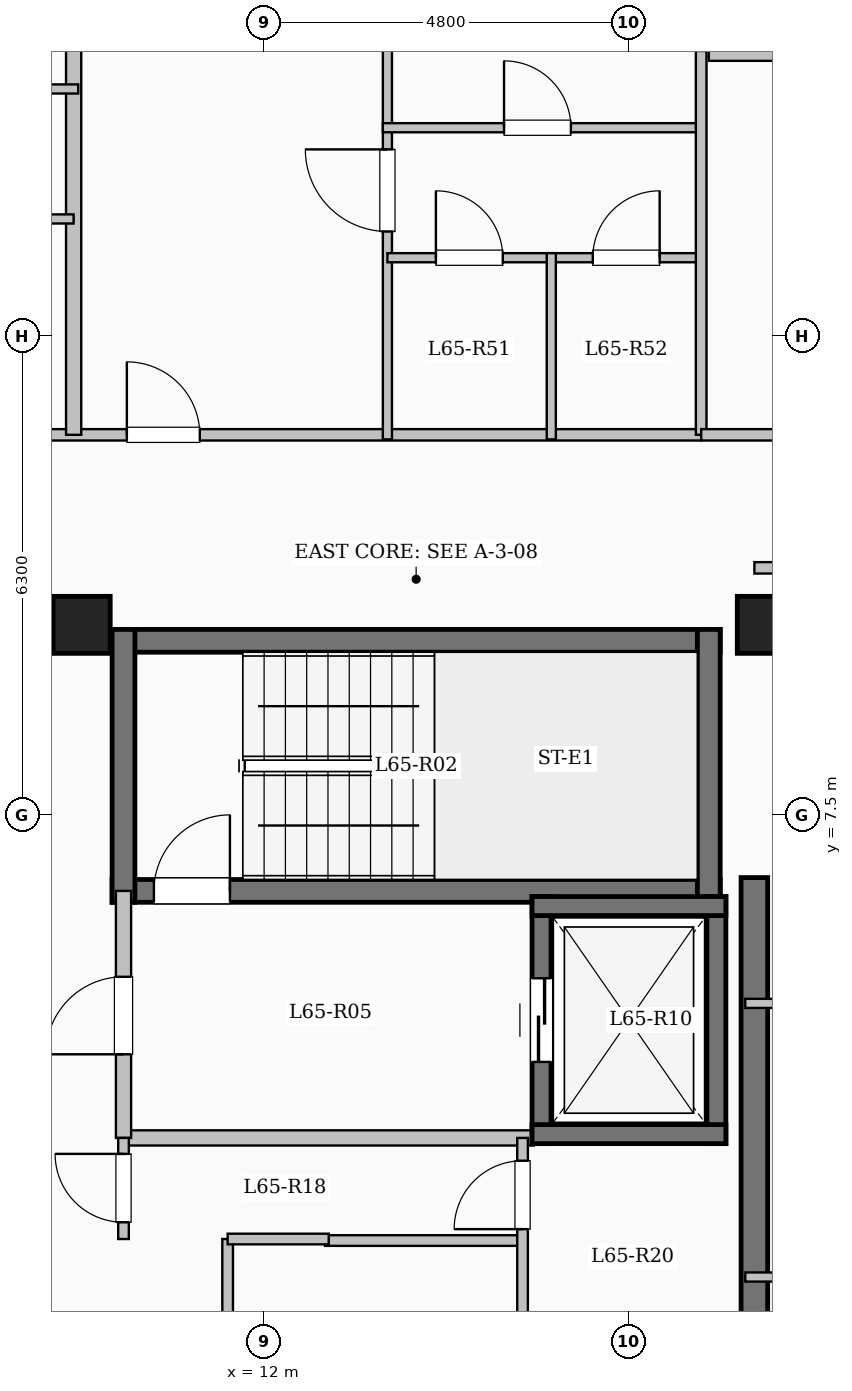
"""IFC4 building model, lengths in metres.
Left out: names, types, materials, properties, quantities, classifications, styles, units other than length and angle.
Written with IfcOpenShell. Run it as: python <this file> out.ifc"""

import sys

from ifc_helpers import new_model, si_unit, direction, frame, frame_2d, origin, origin_2d, place, context, subcontext, project, spatial, rectangle, extrude, element, fill, save


model = new_model("IFC4")
c1 = context("Model", 3, precision=1e-05, world=origin(), true_north=direction((0.0, 1.0)))
c2 = subcontext(c1, "Body", "Model", "MODEL_VIEW")
j1 = project(units=[si_unit("LENGTHUNIT", "METRE"), si_unit("PLANEANGLEUNIT", "RADIAN")], contexts=[c1])
p1 = place(None, origin())
s1 = spatial("IfcSite", under=j1, at=p1, CompositionType="ELEMENT")
p2 = place(p1, origin())
s2 = spatial("IfcBuilding", under=s1, at=p2, CompositionType="ELEMENT")
p3 = place(p2, frame((0.0, 0.0, 241.5)))
s3 = spatial("IfcBuildingStorey", under=s2, at=p3, CompositionType="ELEMENT", Elevation=241.5)
for number, where, z_axis, x_axis in (
    (1, (9.6, 10.0, 0.0), (0.0, 0.0, 1.0), (1.0, 0.0, 0.0)),
    (2, (18.6, 10.0, 0.0), (0.0, 0.0, 1.0), (1.0, 0.0, 0.0)),
):
    element("IfcColumn", number, at=place(p3, frame(where, z_axis=z_axis, x_axis=x_axis)), inside=s3, PredefinedType="COLUMN", context=c2, shape_type="SweptSolid", body=[
        extrude(rectangle(XDim=0.75, YDim=0.75, at=origin_2d()), origin(), (0.0, 0.0, 1.0), 3.35),
    ])
p4 = place(p3, frame((17.85, 17.55, 0.0), z_axis=(0.0, 0.0, 1.0), x_axis=(1.0, 0.0, 0.0)))
e3 = element("IfcWall", 3, at=p4, inside=s3, PredefinedType="SOLIDWALL", context=c2, shape_type="SweptSolid", body=[
    extrude(rectangle(XDim=4.8, YDim=0.26, at=frame_2d((2.4, 0.0))), origin(), (0.0, 0.0, 1.0), 3.1),
])
p5 = place(p4, frame((1.375, 0.0, 0.9)))
e4 = element("IfcOpeningElement", 4, at=p5, cuts=e3, PredefinedType="OPENING", context=c2, shape_type="SweptSolid", body=[
    extrude(rectangle(XDim=2.0, YDim=1.7, at=frame_2d((1.0, 0.85))), frame((0.0, 0.14, 0.0), z_axis=(0.0, -1.0, 0.0), x_axis=(1.0, 0.0, 0.0)), (0.0, 0.0, 1.0), 0.28),
])
p6 = place(p3, frame((10.0, 9.79, 0.0), z_axis=(0.0, 0.0, 1.0), x_axis=(1.0, 0.0, 0.0)))
e5 = element("IfcWall", 5, at=p6, inside=s3, PredefinedType="SHEAR", context=c2, shape_type="SweptSolid", body=[
    extrude(rectangle(XDim=8.0, YDim=0.3, at=frame_2d((4.0, 0.0))), origin(), (0.0, 0.0, 1.0), 3.35),
])
p7 = place(p3, frame((10.0, 6.5, 0.0), z_axis=(0.0, 0.0, 1.0), x_axis=(1.0, 0.0, 0.0)))
e6 = element("IfcWall", 6, at=p7, inside=s3, PredefinedType="SHEAR", context=c2, shape_type="SweptSolid", body=[
    extrude(rectangle(XDim=8.0, YDim=0.3, at=frame_2d((4.0, 0.0))), origin(), (0.0, 0.0, 1.0), 3.35),
])
p8 = place(p7, frame((0.55, 0.0, 0.0)))
e7 = element("IfcOpeningElement", 7, at=p8, cuts=e6, PredefinedType="OPENING", context=c2, shape_type="SweptSolid", body=[
    extrude(rectangle(XDim=1.0, YDim=2.15, at=frame_2d((0.5, 1.075))), frame((0.0, 0.16, 0.0), z_axis=(0.0, -1.0, 0.0), x_axis=(1.0, 0.0, 0.0)), (0.0, 0.0, 1.0), 0.32),
])
for number, where, z_axis, x_axis in (
    (8, (10.15, 6.35, 0.0), (0.0, 0.0, 1.0), (0.0, 1.0, 0.0)),
    (9, (17.85, 6.35, 0.0), (0.0, 0.0, 1.0), (0.0, 1.0, 0.0)),
):
    element("IfcWall", number, at=place(p3, frame(where, z_axis=z_axis, x_axis=x_axis)), inside=s3, PredefinedType="SHEAR", context=c2, shape_type="SweptSolid", body=[
        extrude(rectangle(XDim=3.59, YDim=0.3, at=frame_2d((1.795, 0.0))), origin(), (0.0, 0.0, 1.0), 3.35),
    ])
p9 = place(p3, frame((10.15, 3.25, 0.0), z_axis=(0.0, 0.0, 1.0), x_axis=(1.0, 0.0, 0.0)))
e10 = element("IfcWall", 10, at=p9, inside=s3, PredefinedType="SOLIDWALL", context=c2, shape_type="SweptSolid", body=[
    extrude(rectangle(XDim=5.4, YDim=0.2, at=frame_2d((2.7, 0.0))), origin(), (0.0, 0.0, 1.0), 3.1),
])
p10 = place(p3, frame((10.15, 3.25, 0.0), z_axis=(0.0, 0.0, 1.0), x_axis=(0.0, 1.0, 0.0)))
e11 = element("IfcWall", 11, at=p10, inside=s3, PredefinedType="SOLIDWALL", context=c2, shape_type="SweptSolid", body=[
    extrude(rectangle(XDim=3.25, YDim=0.2, at=frame_2d((1.625, 0.0))), origin(), (0.0, 0.0, 1.0), 3.1),
])
p11 = place(p10, frame((1.1, 0.0, 0.0)))
e12 = element("IfcOpeningElement", 12, at=p11, cuts=e11, PredefinedType="OPENING", context=c2, shape_type="SweptSolid", body=[
    extrude(rectangle(XDim=1.02, YDim=2.15, at=frame_2d((0.51, 1.075))), frame((0.0, 0.11, 0.0), z_axis=(0.0, -1.0, 0.0), x_axis=(1.0, 0.0, 0.0)), (0.0, 0.0, 1.0), 0.22),
])
p12 = place(p3, frame((15.65, 3.175, 0.0), z_axis=(0.0, 0.0, 1.0), x_axis=(0.0, 1.0, 0.0)))
e13 = element("IfcWall", 13, at=p12, inside=s3, PredefinedType="SHEAR", context=c2, shape_type="SweptSolid", body=[
    extrude(rectangle(XDim=3.25, YDim=0.25, at=frame_2d((1.625, 0.0))), origin(), (0.0, 0.0, 1.0), 3.35),
])
p13 = place(p12, frame((1.075, 0.0, 0.0)))
e14 = element("IfcOpeningElement", 14, at=p13, cuts=e13, PredefinedType="OPENING", context=c2, shape_type="SweptSolid", body=[
    extrude(rectangle(XDim=1.1, YDim=2.15, at=frame_2d((0.55, 1.075))), frame((0.0, 0.135, 0.0), z_axis=(0.0, -1.0, 0.0), x_axis=(1.0, 0.0, 0.0)), (0.0, 0.0, 1.0), 0.27),
])
p14 = place(p3, frame((17.95, 3.175, 0.0), z_axis=(0.0, 0.0, 1.0), x_axis=(0.0, 1.0, 0.0)))
e15 = element("IfcWall", 15, at=p14, inside=s3, PredefinedType="SHEAR", context=c2, shape_type="SweptSolid", body=[
    extrude(rectangle(XDim=3.25, YDim=0.25, at=frame_2d((1.625, 0.0))), origin(), (0.0, 0.0, 1.0), 3.35),
])
for number, where, z_axis, x_axis in (
    (16, (15.525, 3.3, 0.0), (0.0, 0.0, 1.0), (1.0, 0.0, 0.0)),
    (17, (15.525, 6.3, 0.0), (0.0, 0.0, 1.0), (1.0, 0.0, 0.0)),
):
    element("IfcWall", number, at=place(p3, frame(where, z_axis=z_axis, x_axis=x_axis)), inside=s3, PredefinedType="SHEAR", context=c2, shape_type="SweptSolid", body=[
        extrude(rectangle(XDim=2.55, YDim=0.25, at=frame_2d((1.275, 0.0))), origin(), (0.0, 0.0, 1.0), 3.35),
    ])
p15 = place(p3, frame((18.45, -7.375, 0.0), z_axis=(0.0, 0.0, 1.0), x_axis=(0.0, 1.0, 0.0)))
e18 = element("IfcWall", 18, at=p15, inside=s3, PredefinedType="SHEAR", context=c2, shape_type="SweptSolid", body=[
    extrude(rectangle(XDim=14.05, YDim=0.35, at=frame_2d((7.025, 0.0))), origin(), (0.0, 0.0, 1.0), 3.35),
])
p16 = place(p3, frame((12.8, 1.9, 0.0), z_axis=(0.0, 0.0, 1.0), x_axis=(1.0, 0.0, 0.0)))
e19 = element("IfcWall", 19, at=p16, inside=s3, PredefinedType="PARTITIONING", context=c2, shape_type="SweptSolid", body=[
    extrude(rectangle(XDim=2.6, YDim=0.14, at=frame_2d((1.3, 0.0))), origin(), (0.0, 0.0, 1.0), 3.1),
])
p17 = place(p3, frame((10.15, 1.92, 0.0), z_axis=(0.0, 0.0, 1.0), x_axis=(0.0, 1.0, 0.0)))
e20 = element("IfcWall", 20, at=p17, inside=s3, PredefinedType="PARTITIONING", context=c2, shape_type="SweptSolid", body=[
    extrude(rectangle(XDim=1.33, YDim=0.14, at=frame_2d((0.665, 0.0))), origin(), (0.0, 0.0, 1.0), 3.1),
])
p18 = place(p17, frame((0.22, 0.0, 0.0)))
e21 = element("IfcOpeningElement", 21, at=p18, cuts=e20, PredefinedType="OPENING", context=c2, shape_type="SweptSolid", body=[
    extrude(rectangle(XDim=0.9, YDim=2.08, at=frame_2d((0.45, 1.04))), frame((0.0, 0.08, 0.0), z_axis=(0.0, -1.0, 0.0), x_axis=(1.0, 0.0, 0.0)), (0.0, 0.0, 1.0), 0.16),
])
p19 = place(p3, frame((15.4, -7.2, 0.0), z_axis=(0.0, 0.0, 1.0), x_axis=(0.0, 1.0, 0.0)))
e22 = element("IfcWall", 22, at=p19, inside=s3, PredefinedType="PARTITIONING", context=c2, shape_type="SweptSolid", body=[
    extrude(rectangle(XDim=10.45, YDim=0.14, at=frame_2d((5.225, 0.0))), origin(), (0.0, 0.0, 1.0), 3.1),
])
p20 = place(p19, frame((9.25, 0.0, 0.0)))
e23 = element("IfcOpeningElement", 23, at=p20, cuts=e22, PredefinedType="OPENING", context=c2, shape_type="SweptSolid", body=[
    extrude(rectangle(XDim=0.9, YDim=2.08, at=frame_2d((0.45, 1.04))), frame((0.0, 0.08, 0.0), z_axis=(0.0, -1.0, 0.0), x_axis=(1.0, 0.0, 0.0)), (0.0, 0.0, 1.0), 0.16),
])
p21 = place(p3, frame((11.52, -7.2, 0.0), z_axis=(0.0, 0.0, 1.0), x_axis=(0.0, 1.0, 0.0)))
e24 = element("IfcWall", 24, at=p21, inside=s3, PredefinedType="PARTITIONING", context=c2, shape_type="SweptSolid", body=[
    extrude(rectangle(XDim=9.12, YDim=0.14, at=frame_2d((4.56, 0.0))), origin(), (0.0, 0.0, 1.0), 3.1),
])
p22 = place(p21, frame((3.8, 0.0, 0.0)))
e25 = element("IfcOpeningElement", 25, at=p22, cuts=e24, PredefinedType="OPENING", context=c2, shape_type="SweptSolid", body=[
    extrude(rectangle(XDim=0.9, YDim=2.08, at=frame_2d((0.45, 1.04))), frame((0.0, 0.08, 0.0), z_axis=(0.0, -1.0, 0.0), x_axis=(1.0, 0.0, 0.0)), (0.0, 0.0, 1.0), 0.16),
])
p23 = place(p3, frame((11.52, 1.92, 0.0), z_axis=(0.0, 0.0, 1.0), x_axis=(1.0, 0.0, 0.0)))
e26 = element("IfcWall", 26, at=p23, inside=s3, PredefinedType="PARTITIONING", context=c2, shape_type="SweptSolid", body=[
    extrude(rectangle(XDim=1.33, YDim=0.14, at=frame_2d((0.665, 0.0))), origin(), (0.0, 0.0, 1.0), 3.1),
])
p24 = place(p3, frame((3.85, 12.5, 0.0), z_axis=(0.0, 0.0, 1.0), x_axis=(1.0, 0.0, 0.0)))
e27 = element("IfcWall", 27, at=p24, inside=s3, PredefinedType="PARTITIONING", context=c2, shape_type="SweptSolid", body=[
    extrude(rectangle(XDim=13.9, YDim=0.15, at=frame_2d((6.95, 0.0))), origin(), (0.0, 0.0, 1.0), 3.1),
])
p25 = place(p24, frame((0.7, 0.0, 0.0)))
e28 = element("IfcOpeningElement", 28, at=p25, cuts=e27, PredefinedType="OPENING", context=c2, shape_type="SweptSolid", body=[
    extrude(rectangle(XDim=0.96, YDim=2.15, at=frame_2d((0.48, 1.075))), frame((0.0, 0.085, 0.0), z_axis=(0.0, -1.0, 0.0), x_axis=(1.0, 0.0, 0.0)), (0.0, 0.0, 1.0), 0.17),
])
p26 = place(p24, frame((6.344, 0.0, 0.0)))
e29 = element("IfcOpeningElement", 29, at=p26, cuts=e27, PredefinedType="OPENING", context=c2, shape_type="SweptSolid", body=[
    extrude(rectangle(XDim=0.96, YDim=2.15, at=frame_2d((0.48, 1.075))), frame((0.0, 0.085, 0.0), z_axis=(0.0, -1.0, 0.0), x_axis=(1.0, 0.0, 0.0)), (0.0, 0.0, 1.0), 0.17),
])
p27 = place(p3, frame((9.494, 12.5, 0.0), z_axis=(0.0, 0.0, 1.0), x_axis=(0.0, 1.0, 0.0)))
e30 = element("IfcWall", 30, at=p27, inside=s3, PredefinedType="SOLIDWALL", context=c2, shape_type="SweptSolid", body=[
    extrude(rectangle(XDim=8.771, YDim=0.2, at=frame_2d((4.385, 0.0))), origin(), (0.0, 0.0, 1.0), 3.1),
])
p28 = place(p3, frame((6.734, 15.34, 0.0), z_axis=(0.0, 0.0, 1.0), x_axis=(1.0, 0.0, 0.0)))
e31 = element("IfcWall", 31, at=p28, inside=s3, PredefinedType="PARTITIONING", context=c2, shape_type="SweptSolid", body=[
    extrude(rectangle(XDim=2.76, YDim=0.12, at=frame_2d((1.38, 0.0))), origin(), (0.0, 0.0, 1.0), 2.785),
])
p29 = place(p28, frame((0.94, 0.0, 0.0)))
e32 = element("IfcOpeningElement", 32, at=p29, cuts=e31, PredefinedType="OPENING", context=c2, shape_type="SweptSolid", body=[
    extrude(rectangle(XDim=0.88, YDim=2.1, at=frame_2d((0.44, 1.05))), frame((0.0, 0.07, 0.0), z_axis=(0.0, -1.0, 0.0), x_axis=(1.0, 0.0, 0.0)), (0.0, 0.0, 1.0), 0.14),
])
p30 = place(p3, frame((4.08, 17.05, 0.0), z_axis=(0.0, 0.0, 1.0), x_axis=(1.0, 0.0, 0.0)))
e33 = element("IfcWall", 33, at=p30, inside=s3, PredefinedType="PARTITIONING", context=c2, shape_type="SweptSolid", body=[
    extrude(rectangle(XDim=5.474, YDim=0.12, at=frame_2d((2.737, 0.0))), origin(), (0.0, 0.0, 1.0), 2.785),
])
p31 = place(p30, frame((0.883, 0.0, 0.0)))
e34 = element("IfcOpeningElement", 34, at=p31, cuts=e33, PredefinedType="OPENING", context=c2, shape_type="SweptSolid", body=[
    extrude(rectangle(XDim=0.88, YDim=2.1, at=frame_2d((0.44, 1.05))), frame((0.0, 0.07, 0.0), z_axis=(0.0, -1.0, 0.0), x_axis=(1.0, 0.0, 0.0)), (0.0, 0.0, 1.0), 0.14),
])
p32 = place(p30, frame((3.53, 0.0, 0.0)))
e35 = element("IfcOpeningElement", 35, at=p32, cuts=e33, PredefinedType="OPENING", context=c2, shape_type="SweptSolid", body=[
    extrude(rectangle(XDim=0.88, YDim=2.1, at=frame_2d((0.44, 1.05))), frame((0.0, 0.07, 0.0), z_axis=(0.0, -1.0, 0.0), x_axis=(1.0, 0.0, 0.0)), (0.0, 0.0, 1.0), 0.14),
])
p33 = place(p3, frame((13.622, 12.44, 0.0), z_axis=(0.0, 0.0, 1.0), x_axis=(0.0, 1.0, 0.0)))
e36 = element("IfcWall", 36, at=p33, inside=s3, PredefinedType="PARTITIONING", context=c2, shape_type="SweptSolid", body=[
    extrude(rectangle(XDim=8.46, YDim=0.12, at=frame_2d((4.23, 0.0))), origin(), (0.0, 0.0, 1.0), 3.1),
])
p34 = place(p33, frame((2.735, 0.0, 0.0)))
e37 = element("IfcOpeningElement", 37, at=p34, cuts=e36, PredefinedType="OPENING", context=c2, shape_type="SweptSolid", body=[
    extrude(rectangle(XDim=1.08, YDim=2.15, at=frame_2d((0.54, 1.075))), frame((0.0, 0.07, 0.0), z_axis=(0.0, -1.0, 0.0), x_axis=(1.0, 0.0, 0.0)), (0.0, 0.0, 1.0), 0.14),
])
p35 = place(p3, frame((13.622, 14.83, 0.0), z_axis=(0.0, 0.0, 1.0), x_axis=(1.0, 0.0, 0.0)))
e38 = element("IfcWall", 38, at=p35, inside=s3, PredefinedType="PARTITIONING", context=c2, shape_type="SweptSolid", body=[
    extrude(rectangle(XDim=2.156, YDim=0.12, at=frame_2d((1.078, 0.0))), origin(), (0.0, 0.0, 1.0), 3.1),
])
p36 = place(p35, frame((0.638, 0.0, 0.0)))
e39 = element("IfcOpeningElement", 39, at=p36, cuts=e38, PredefinedType="OPENING", context=c2, shape_type="SweptSolid", body=[
    extrude(rectangle(XDim=0.88, YDim=2.1, at=frame_2d((0.44, 1.05))), frame((0.0, 0.07, 0.0), z_axis=(0.0, -1.0, 0.0), x_axis=(1.0, 0.0, 0.0)), (0.0, 0.0, 1.0), 0.14),
])
p37 = place(p3, frame((15.778, 14.83, 0.0), z_axis=(0.0, 0.0, 1.0), x_axis=(1.0, 0.0, 0.0)))
e40 = element("IfcWall", 40, at=p37, inside=s3, PredefinedType="PARTITIONING", context=c2, shape_type="SweptSolid", body=[
    extrude(rectangle(XDim=1.972, YDim=0.12, at=frame_2d((0.986, 0.0))), origin(), (0.0, 0.0, 1.0), 3.1),
])
p38 = place(p37, frame((0.546, 0.0, 0.0)))
e41 = element("IfcOpeningElement", 41, at=p38, cuts=e40, PredefinedType="OPENING", context=c2, shape_type="SweptSolid", body=[
    extrude(rectangle(XDim=0.88, YDim=2.1, at=frame_2d((0.44, 1.05))), frame((0.0, 0.07, 0.0), z_axis=(0.0, -1.0, 0.0), x_axis=(1.0, 0.0, 0.0)), (0.0, 0.0, 1.0), 0.14),
])
p39 = place(p3, frame((13.562, 16.54, 0.0), z_axis=(0.0, 0.0, 1.0), x_axis=(1.0, 0.0, 0.0)))
e42 = element("IfcWall", 42, at=p39, inside=s3, PredefinedType="PARTITIONING", context=c2, shape_type="SweptSolid", body=[
    extrude(rectangle(XDim=4.248, YDim=0.12, at=frame_2d((2.124, 0.0))), origin(), (0.0, 0.0, 1.0), 3.1),
])
p40 = place(p39, frame((1.594, 0.0, 0.0)))
e43 = element("IfcOpeningElement", 43, at=p40, cuts=e42, PredefinedType="OPENING", context=c2, shape_type="SweptSolid", body=[
    extrude(rectangle(XDim=0.88, YDim=2.1, at=frame_2d((0.44, 1.05))), frame((0.0, 0.07, 0.0), z_axis=(0.0, -1.0, 0.0), x_axis=(1.0, 0.0, 0.0)), (0.0, 0.0, 1.0), 0.14),
])
p41 = place(p3, frame((15.778, 12.44, 0.0), z_axis=(0.0, 0.0, 1.0), x_axis=(0.0, 1.0, 0.0)))
e44 = element("IfcWall", 44, at=p41, inside=s3, PredefinedType="PARTITIONING", context=c2, shape_type="SweptSolid", body=[
    extrude(rectangle(XDim=2.45, YDim=0.12, at=frame_2d((1.225, 0.0))), origin(), (0.0, 0.0, 1.0), 3.1),
])
p42 = place(p3, frame((18.45, 10.75, 0.0), z_axis=(0.0, 0.0, 1.0), x_axis=(1.0, 0.0, 0.0)))
e45 = element("IfcWall", 45, at=p42, inside=s3, PredefinedType="PARTITIONING", context=c2, shape_type="SweptSolid", body=[
    extrude(rectangle(XDim=4.23, YDim=0.15, at=frame_2d((2.115, 0.0))), origin(), (0.0, 0.0, 1.0), 3.1),
])
p43 = place(p3, frame((17.75, 12.5, 0.0), z_axis=(0.0, 0.0, 1.0), x_axis=(0.0, 1.0, 0.0)))
e46 = element("IfcWall", 46, at=p43, inside=s3, PredefinedType="PARTITIONING", context=c2, shape_type="SweptSolid", body=[
    extrude(rectangle(XDim=5.05, YDim=0.14, at=frame_2d((2.525, 0.0))), origin(), (0.0, 0.0, 1.0), 3.1),
])
p44 = place(p3, frame((17.75, 12.5, 0.0), z_axis=(0.0, 0.0, 1.0), x_axis=(1.0, 0.0, 0.0)))
e47 = element("IfcWall", 47, at=p44, inside=s3, PredefinedType="PARTITIONING", context=c2, shape_type="SweptSolid", body=[
    extrude(rectangle(XDim=4.93, YDim=0.15, at=frame_2d((2.465, 0.0))), origin(), (0.0, 0.0, 1.0), 3.1),
])
p45 = place(p44, frame((1.99, 0.0, 0.0)))
e48 = element("IfcOpeningElement", 48, at=p45, cuts=e47, PredefinedType="OPENING", context=c2, shape_type="SweptSolid", body=[
    extrude(rectangle(XDim=0.95, YDim=2.15, at=frame_2d((0.475, 1.075))), frame((0.0, 0.085, 0.0), z_axis=(0.0, -1.0, 0.0), x_axis=(1.0, 0.0, 0.0)), (0.0, 0.0, 1.0), 0.17),
])
p46 = place(p3, frame((18.33, 1.42, 0.0), z_axis=(0.0, 0.0, 1.0), x_axis=(1.0, 0.0, 0.0)))
e49 = element("IfcWall", 49, at=p46, inside=s3, PredefinedType="PARTITIONING", context=c2, shape_type="SweptSolid", body=[
    extrude(rectangle(XDim=4.47, YDim=0.12, at=frame_2d((2.235, 0.0))), origin(), (0.0, 0.0, 1.0), 3.1),
])
p47 = place(p46, frame((0.813, 0.0, 0.0)))
e50 = element("IfcOpeningElement", 50, at=p47, cuts=e49, PredefinedType="OPENING", context=c2, shape_type="SweptSolid", body=[
    extrude(rectangle(XDim=0.88, YDim=2.1, at=frame_2d((0.44, 1.05))), frame((0.0, 0.07, 0.0), z_axis=(0.0, -1.0, 0.0), x_axis=(1.0, 0.0, 0.0)), (0.0, 0.0, 1.0), 0.14),
])
p48 = place(p46, frame((2.878, 0.0, 0.0)))
e51 = element("IfcOpeningElement", 51, at=p48, cuts=e49, PredefinedType="OPENING", context=c2, shape_type="SweptSolid", body=[
    extrude(rectangle(XDim=0.88, YDim=2.1, at=frame_2d((0.44, 1.05))), frame((0.0, 0.07, 0.0), z_axis=(0.0, -1.0, 0.0), x_axis=(1.0, 0.0, 0.0)), (0.0, 0.0, 1.0), 0.14),
])
p49 = place(p3, frame((18.33, 5.02, 0.0), z_axis=(0.0, 0.0, 1.0), x_axis=(1.0, 0.0, 0.0)))
e52 = element("IfcWall", 52, at=p49, inside=s3, PredefinedType="PARTITIONING", context=c2, shape_type="SweptSolid", body=[
    extrude(rectangle(XDim=4.47, YDim=0.12, at=frame_2d((2.235, 0.0))), origin(), (0.0, 0.0, 1.0), 3.1),
])
p50 = place(p49, frame((0.77, 0.0, 0.0)))
e53 = element("IfcOpeningElement", 53, at=p50, cuts=e52, PredefinedType="OPENING", context=c2, shape_type="SweptSolid", body=[
    extrude(rectangle(XDim=0.88, YDim=2.1, at=frame_2d((0.44, 1.05))), frame((0.0, 0.07, 0.0), z_axis=(0.0, -1.0, 0.0), x_axis=(1.0, 0.0, 0.0)), (0.0, 0.0, 1.0), 0.14),
])
p51 = place(p8, origin())
e54 = element("IfcDoor", 54, at=p51, inside=s3, OperationType="SINGLE_SWING_RIGHT", PredefinedType="DOOR", context=c2, shape_type="SweptSolid", body=[
    extrude(rectangle(XDim=1.0, YDim=2.15, at=frame_2d((0.5, 1.075))), frame((0.0, 0.025, 0.0), z_axis=(0.0, -1.0, 0.0), x_axis=(1.0, 0.0, 0.0)), (0.0, 0.0, 1.0), 0.05),
])
fill(e7, e54)
p52 = place(p11, origin())
e55 = element("IfcDoor", 55, at=p52, inside=s3, OperationType="SINGLE_SWING_LEFT", PredefinedType="DOOR", context=c2, shape_type="SweptSolid", body=[
    extrude(rectangle(XDim=1.02, YDim=2.15, at=frame_2d((0.51, 1.075))), frame((0.0, 0.025, 0.0), z_axis=(0.0, -1.0, 0.0), x_axis=(1.0, 0.0, 0.0)), (0.0, 0.0, 1.0), 0.05),
])
fill(e12, e55)
p53 = place(p13, origin())
e56 = element("IfcDoor", 56, at=p53, inside=s3, OperationType="SLIDING_TO_LEFT", PredefinedType="DOOR", context=c2, shape_type="SweptSolid", body=[
    extrude(rectangle(XDim=1.1, YDim=2.15, at=frame_2d((0.55, 1.075))), frame((0.0, 0.025, 0.0), z_axis=(0.0, -1.0, 0.0), x_axis=(1.0, 0.0, 0.0)), (0.0, 0.0, 1.0), 0.05),
])
fill(e14, e56)
p54 = place(p18, origin())
e57 = element("IfcDoor", 57, at=p54, inside=s3, OperationType="SINGLE_SWING_RIGHT", PredefinedType="DOOR", context=c2, shape_type="SweptSolid", body=[
    extrude(rectangle(XDim=0.9, YDim=2.08, at=frame_2d((0.45, 1.04))), frame((0.0, 0.025, 0.0), z_axis=(0.0, -1.0, 0.0), x_axis=(1.0, 0.0, 0.0)), (0.0, 0.0, 1.0), 0.05),
])
fill(e21, e57)
p55 = place(p20, origin())
e58 = element("IfcDoor", 58, at=p55, inside=s3, OperationType="SINGLE_SWING_LEFT", PredefinedType="DOOR", context=c2, shape_type="SweptSolid", body=[
    extrude(rectangle(XDim=0.9, YDim=2.08, at=frame_2d((0.45, 1.04))), frame((0.0, 0.025, 0.0), z_axis=(0.0, -1.0, 0.0), x_axis=(1.0, 0.0, 0.0)), (0.0, 0.0, 1.0), 0.05),
])
fill(e23, e58)
p56 = place(p26, origin())
e59 = element("IfcDoor", 59, at=p56, inside=s3, OperationType="SINGLE_SWING_LEFT", PredefinedType="DOOR", context=c2, shape_type="SweptSolid", body=[
    extrude(rectangle(XDim=0.96, YDim=2.15, at=frame_2d((0.48, 1.075))), frame((0.0, 0.025, 0.0), z_axis=(0.0, -1.0, 0.0), x_axis=(1.0, 0.0, 0.0)), (0.0, 0.0, 1.0), 0.05),
])
fill(e29, e59)
p57 = place(p34, origin())
e60 = element("IfcDoor", 60, at=p57, inside=s3, OperationType="SINGLE_SWING_RIGHT", PredefinedType="DOOR", context=c2, shape_type="SweptSolid", body=[
    extrude(rectangle(XDim=1.08, YDim=2.15, at=frame_2d((0.54, 1.075))), frame((0.0, 0.025, 0.0), z_axis=(0.0, -1.0, 0.0), x_axis=(1.0, 0.0, 0.0)), (0.0, 0.0, 1.0), 0.05),
])
fill(e37, e60)
p58 = place(p36, origin())
e61 = element("IfcDoor", 61, at=p58, inside=s3, OperationType="SINGLE_SWING_LEFT", PredefinedType="DOOR", context=c2, shape_type="SweptSolid", body=[
    extrude(rectangle(XDim=0.88, YDim=2.1, at=frame_2d((0.44, 1.05))), frame((0.0, 0.025, 0.0), z_axis=(0.0, -1.0, 0.0), x_axis=(1.0, 0.0, 0.0)), (0.0, 0.0, 1.0), 0.05),
])
fill(e39, e61)
p59 = place(p38, origin())
e62 = element("IfcDoor", 62, at=p59, inside=s3, OperationType="SINGLE_SWING_RIGHT", PredefinedType="DOOR", context=c2, shape_type="SweptSolid", body=[
    extrude(rectangle(XDim=0.88, YDim=2.1, at=frame_2d((0.44, 1.05))), frame((0.0, 0.025, 0.0), z_axis=(0.0, -1.0, 0.0), x_axis=(1.0, 0.0, 0.0)), (0.0, 0.0, 1.0), 0.05),
])
fill(e41, e62)
p60 = place(p40, origin())
e63 = element("IfcDoor", 63, at=p60, inside=s3, OperationType="SINGLE_SWING_LEFT", PredefinedType="DOOR", context=c2, shape_type="SweptSolid", body=[
    extrude(rectangle(XDim=0.88, YDim=2.1, at=frame_2d((0.44, 1.05))), frame((0.0, 0.025, 0.0), z_axis=(0.0, -1.0, 0.0), x_axis=(1.0, 0.0, 0.0)), (0.0, 0.0, 1.0), 0.05),
])
fill(e43, e63)
save(model, sys.argv[1])
